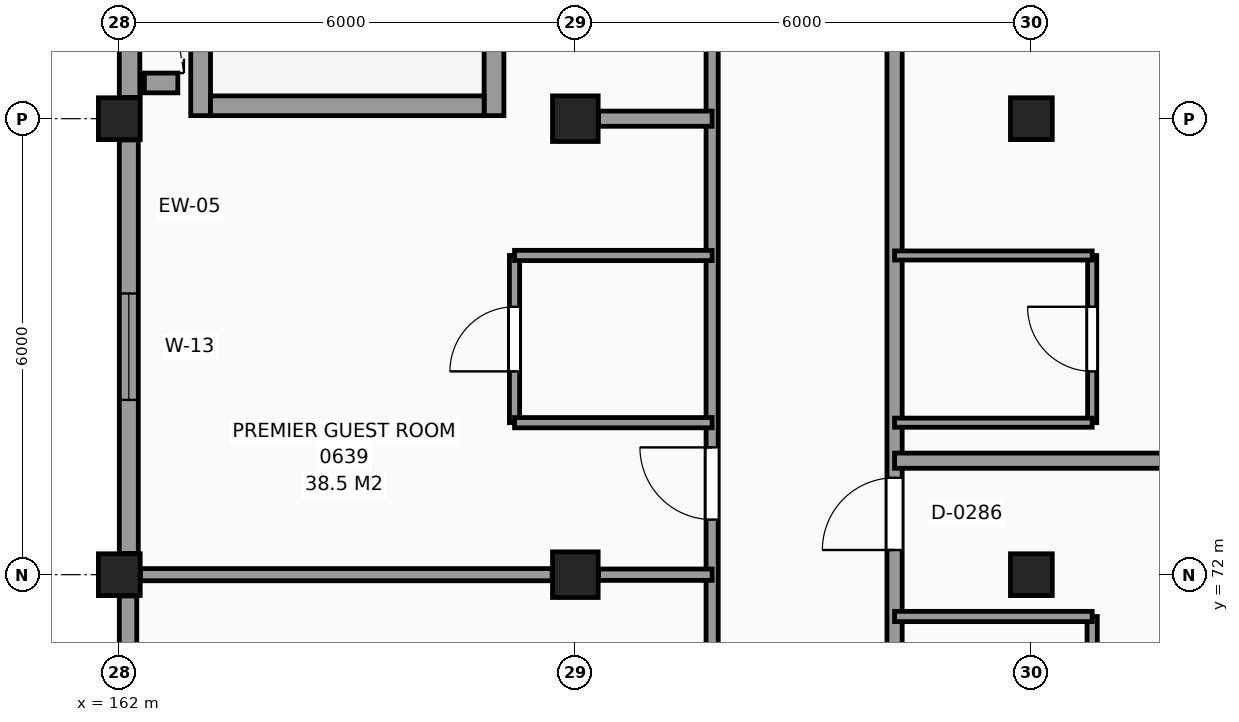
"""IFC4 building model, lengths in metres.
Left out: names, types, materials, properties, quantities, classifications, styles, units other than length and angle.
Written with IfcOpenShell. Run it as: python <this file> out.ifc"""

import sys

from ifc_helpers import new_model, si_unit, direction, frame, frame_2d, origin, origin_2d, place, context, subcontext, project, spatial, rectangle, extrude, element, fill, save


model = new_model("IFC4")
c1 = context("Model", 3, precision=1e-05, world=origin(), true_north=direction((0.0, 1.0)))
c2 = subcontext(c1, "Body", "Model", "MODEL_VIEW")
j1 = project(units=[si_unit("LENGTHUNIT", "METRE"), si_unit("PLANEANGLEUNIT", "RADIAN")], contexts=[c1])
p1 = place(None, origin())
s1 = spatial("IfcSite", under=j1, at=p1, CompositionType="ELEMENT")
p2 = place(p1, origin())
s2 = spatial("IfcBuilding", under=s1, at=p2, CompositionType="ELEMENT")
p3 = place(p2, frame((0.0, 0.0, 28.2)))
s3 = spatial("IfcBuildingStorey", under=s2, at=p3, CompositionType="ELEMENT", Elevation=28.2)
for number, where, z_axis, x_axis in (
    (1, (162.0, 72.0, 0.0), (0.0, 0.0, 1.0), (1.0, 0.0, 0.0)),
    (2, (162.0, 78.0, 0.0), (0.0, 0.0, 1.0), (1.0, 0.0, 0.0)),
):
    element("IfcColumn", number, at=place(p3, frame(where, z_axis=z_axis, x_axis=x_axis)), inside=s3, PredefinedType="COLUMN", context=c2, shape_type="SweptSolid", body=[
        extrude(rectangle(XDim=0.55, YDim=0.55, at=origin_2d()), origin(), (0.0, 0.0, 1.0), 3.3),
    ])
for number, where, z_axis, x_axis in (
    (3, (168.0, 72.0, 0.0), (0.0, 0.0, 1.0), (1.0, 0.0, 0.0)),
    (4, (168.0, 78.0, 0.0), (0.0, 0.0, 1.0), (1.0, 0.0, 0.0)),
):
    element("IfcColumn", number, at=place(p3, frame(where, z_axis=z_axis, x_axis=x_axis)), inside=s3, PredefinedType="COLUMN", context=c2, shape_type="SweptSolid", body=[
        extrude(rectangle(XDim=0.6, YDim=0.6, at=origin_2d()), origin(), (0.0, 0.0, 1.0), 3.3),
    ])
for number, where, z_axis, x_axis in (
    (5, (174.0, 72.0, 0.0), (0.0, 0.0, 1.0), (1.0, 0.0, 0.0)),
    (6, (174.0, 78.0, 0.0), (0.0, 0.0, 1.0), (1.0, 0.0, 0.0)),
):
    element("IfcColumn", number, at=place(p3, frame(where, z_axis=z_axis, x_axis=x_axis)), inside=s3, PredefinedType="COLUMN", context=c2, shape_type="SweptSolid", body=[
        extrude(rectangle(XDim=0.55, YDim=0.55, at=origin_2d()), origin(), (0.0, 0.0, 1.0), 3.3),
    ])
p4 = place(p3, frame((162.135, 83.72, 0.0), z_axis=(0.0, 0.0, 1.0), x_axis=(0.0, -1.0, 0.0)))
e7 = element("IfcWall", 7, at=p4, inside=s3, PredefinedType="SOLIDWALL", context=c2, shape_type="SweptSolid", body=[
    extrude(rectangle(XDim=5.44, YDim=0.27, at=frame_2d((2.72, 0.0))), origin(), (0.0, 0.0, 1.0), 3.08),
])
p5 = place(p3, frame((162.125, 77.72, 0.0), z_axis=(0.0, 0.0, 1.0), x_axis=(0.0, -1.0, 0.0)))
e8 = element("IfcWall", 8, at=p5, inside=s3, PredefinedType="SOLIDWALL", context=c2, shape_type="SweptSolid", body=[
    extrude(rectangle(XDim=5.44, YDim=0.25, at=frame_2d((2.72, 0.0))), origin(), (0.0, 0.0, 1.0), 2.43),
])
p6 = place(p5, frame((2.02, 0.0, 0.8)))
e9 = element("IfcOpeningElement", 9, at=p6, cuts=e8, PredefinedType="OPENING", context=c2, shape_type="SweptSolid", body=[
    extrude(rectangle(XDim=1.4, YDim=1.4, at=frame_2d((0.7, 0.7))), frame((0.0, 0.135, 0.0), z_axis=(0.0, -1.0, 0.0), x_axis=(1.0, 0.0, 0.0)), (0.0, 0.0, 1.0), 0.27),
])
p7 = place(p3, frame((162.115, 71.72, 0.0), z_axis=(0.0, 0.0, 1.0), x_axis=(0.0, -1.0, 0.0)))
e10 = element("IfcWall", 10, at=p7, inside=s3, PredefinedType="SOLIDWALL", context=c2, shape_type="SweptSolid", body=[
    extrude(rectangle(XDim=5.44, YDim=0.23, at=frame_2d((2.72, 0.0))), origin(), (0.0, 0.0, 1.0), 2.43),
])
p8 = place(p7, frame((2.02, 0.0, 0.8)))
e11 = element("IfcOpeningElement", 11, at=p8, cuts=e10, PredefinedType="OPENING", context=c2, shape_type="SweptSolid", body=[
    extrude(rectangle(XDim=1.4, YDim=1.4, at=frame_2d((0.7, 0.7))), frame((0.0, 0.125, 0.0), z_axis=(0.0, -1.0, 0.0), x_axis=(1.0, 0.0, 0.0)), (0.0, 0.0, 1.0), 0.25),
])
for number, where, z_axis, x_axis in (
    (12, (163.07, 78.04, 0.0), (0.0, 0.0, 1.0), (0.0, 1.0, 0.0)),
    (13, (166.93, 78.04, 0.0), (0.0, 0.0, 1.0), (0.0, 1.0, 0.0)),
):
    element("IfcWall", number, at=place(p3, frame(where, z_axis=z_axis, x_axis=x_axis)), inside=s3, PredefinedType="SHEAR", context=c2, shape_type="SweptSolid", body=[
        extrude(rectangle(XDim=10.72, YDim=0.26, at=frame_2d((5.36, 0.0))), origin(), (0.0, 0.0, 1.0), 3.3),
    ])
p9 = place(p3, frame((163.2, 78.17, 0.0), z_axis=(0.0, 0.0, 1.0), x_axis=(1.0, 0.0, 0.0)))
e14 = element("IfcWall", 14, at=p9, inside=s3, PredefinedType="SHEAR", context=c2, shape_type="SweptSolid", body=[
    extrude(rectangle(XDim=3.6, YDim=0.26, at=frame_2d((1.8, 0.0))), origin(), (0.0, 0.0, 1.0), 3.3),
])
p10 = place(p3, frame((162.33, 78.47, 0.0), z_axis=(0.0, 0.0, 1.0), x_axis=(1.0, 0.0, 0.0)))
e15 = element("IfcWall", 15, at=p10, inside=s3, PredefinedType="SHEAR", context=c2, shape_type="SweptSolid", body=[
    extrude(rectangle(XDim=0.44, YDim=0.26, at=frame_2d((0.22, 0.0))), origin(), (0.0, 0.0, 1.0), 3.3),
])
p11 = place(p3, frame((167.2, 74.0, 0.0), z_axis=(0.0, 0.0, 1.0), x_axis=(0.0, 1.0, 0.0)))
e16 = element("IfcWall", 16, at=p11, inside=s3, PredefinedType="PARTITIONING", context=c2, shape_type="SweptSolid", body=[
    extrude(rectangle(XDim=2.2, YDim=0.135, at=frame_2d((1.1, 0.0))), origin(), (0.0, 0.0, 1.0), 3.08),
])
p12 = place(p11, frame((0.675, 0.0, 0.0)))
e17 = element("IfcOpeningElement", 17, at=p12, cuts=e16, PredefinedType="OPENING", context=c2, shape_type="SweptSolid", body=[
    extrude(rectangle(XDim=0.85, YDim=2.1, at=frame_2d((0.425, 1.05))), frame((0.0, 0.078, 0.0), z_axis=(0.0, -1.0, 0.0), x_axis=(1.0, 0.0, 0.0)), (0.0, 0.0, 1.0), 0.155),
])
p13 = place(p3, frame((169.8, 42.275, 0.0), z_axis=(0.0, 0.0, 1.0), x_axis=(0.0, 1.0, 0.0)))
e18 = element("IfcWall", 18, at=p13, inside=s3, PredefinedType="PARTITIONING", context=c2, shape_type="SweptSolid", body=[
    extrude(rectangle(XDim=65.545, YDim=0.16, at=frame_2d((32.772, 0.0))), origin(), (0.0, 0.0, 1.0), 3.08),
])
p14 = place(p13, frame((50.125, 0.0, 0.0)))
e19 = element("IfcOpeningElement", 19, at=p14, cuts=e18, PredefinedType="OPENING", context=c2, shape_type="SweptSolid", body=[
    extrude(rectangle(XDim=1.2, YDim=2.2, at=frame_2d((0.6, 1.1))), frame((0.0, 0.09, 0.0), z_axis=(0.0, -1.0, 0.0), x_axis=(1.0, 0.0, 0.0)), (0.0, 0.0, 1.0), 0.18),
])
p15 = place(p13, frame((0.4, 0.0, 0.0)))
e20 = element("IfcOpeningElement", 20, at=p15, cuts=e18, PredefinedType="OPENING", context=c2, shape_type="SweptSolid", body=[
    extrude(rectangle(XDim=0.95, YDim=2.1, at=frame_2d((0.475, 1.05))), frame((0.0, 0.09, 0.0), z_axis=(0.0, -1.0, 0.0), x_axis=(1.0, 0.0, 0.0)), (0.0, 0.0, 1.0), 0.18),
])
p16 = place(p13, frame((6.45, 0.0, 0.0)))
e21 = element("IfcOpeningElement", 21, at=p16, cuts=e18, PredefinedType="OPENING", context=c2, shape_type="SweptSolid", body=[
    extrude(rectangle(XDim=0.95, YDim=2.1, at=frame_2d((0.475, 1.05))), frame((0.0, 0.09, 0.0), z_axis=(0.0, -1.0, 0.0), x_axis=(1.0, 0.0, 0.0)), (0.0, 0.0, 1.0), 0.18),
])
p17 = place(p13, frame((12.45, 0.0, 0.0)))
e22 = element("IfcOpeningElement", 22, at=p17, cuts=e18, PredefinedType="OPENING", context=c2, shape_type="SweptSolid", body=[
    extrude(rectangle(XDim=0.95, YDim=2.1, at=frame_2d((0.475, 1.05))), frame((0.0, 0.09, 0.0), z_axis=(0.0, -1.0, 0.0), x_axis=(1.0, 0.0, 0.0)), (0.0, 0.0, 1.0), 0.18),
])
p18 = place(p13, frame((18.45, 0.0, 0.0)))
e23 = element("IfcOpeningElement", 23, at=p18, cuts=e18, PredefinedType="OPENING", context=c2, shape_type="SweptSolid", body=[
    extrude(rectangle(XDim=0.95, YDim=2.1, at=frame_2d((0.475, 1.05))), frame((0.0, 0.09, 0.0), z_axis=(0.0, -1.0, 0.0), x_axis=(1.0, 0.0, 0.0)), (0.0, 0.0, 1.0), 0.18),
])
p19 = place(p13, frame((24.45, 0.0, 0.0)))
e24 = element("IfcOpeningElement", 24, at=p19, cuts=e18, PredefinedType="OPENING", context=c2, shape_type="SweptSolid", body=[
    extrude(rectangle(XDim=0.95, YDim=2.1, at=frame_2d((0.475, 1.05))), frame((0.0, 0.09, 0.0), z_axis=(0.0, -1.0, 0.0), x_axis=(1.0, 0.0, 0.0)), (0.0, 0.0, 1.0), 0.18),
])
p20 = place(p13, frame((30.45, 0.0, 0.0)))
e25 = element("IfcOpeningElement", 25, at=p20, cuts=e18, PredefinedType="OPENING", context=c2, shape_type="SweptSolid", body=[
    extrude(rectangle(XDim=0.95, YDim=2.1, at=frame_2d((0.475, 1.05))), frame((0.0, 0.09, 0.0), z_axis=(0.0, -1.0, 0.0), x_axis=(1.0, 0.0, 0.0)), (0.0, 0.0, 1.0), 0.18),
])
p21 = place(p13, frame((54.45, 0.0, 0.0)))
e26 = element("IfcOpeningElement", 26, at=p21, cuts=e18, PredefinedType="OPENING", context=c2, shape_type="SweptSolid", body=[
    extrude(rectangle(XDim=0.95, YDim=2.1, at=frame_2d((0.475, 1.05))), frame((0.0, 0.09, 0.0), z_axis=(0.0, -1.0, 0.0), x_axis=(1.0, 0.0, 0.0)), (0.0, 0.0, 1.0), 0.18),
])
p22 = place(p13, frame((60.45, 0.0, 0.0)))
e27 = element("IfcOpeningElement", 27, at=p22, cuts=e18, PredefinedType="OPENING", context=c2, shape_type="SweptSolid", body=[
    extrude(rectangle(XDim=0.95, YDim=2.1, at=frame_2d((0.475, 1.05))), frame((0.0, 0.09, 0.0), z_axis=(0.0, -1.0, 0.0), x_axis=(1.0, 0.0, 0.0)), (0.0, 0.0, 1.0), 0.18),
])
p23 = place(p3, frame((172.2, 42.275, 0.0), z_axis=(0.0, 0.0, 1.0), x_axis=(0.0, 1.0, 0.0)))
e28 = element("IfcWall", 28, at=p23, inside=s3, PredefinedType="PARTITIONING", context=c2, shape_type="SweptSolid", body=[
    extrude(rectangle(XDim=65.545, YDim=0.2, at=frame_2d((32.772, 0.0))), origin(), (0.0, 0.0, 1.0), 3.08),
])
p24 = place(p23, frame((0.4, 0.0, 0.0)))
e29 = element("IfcOpeningElement", 29, at=p24, cuts=e28, PredefinedType="OPENING", context=c2, shape_type="SweptSolid", body=[
    extrude(rectangle(XDim=0.95, YDim=2.1, at=frame_2d((0.475, 1.05))), frame((0.0, 0.11, 0.0), z_axis=(0.0, -1.0, 0.0), x_axis=(1.0, 0.0, 0.0)), (0.0, 0.0, 1.0), 0.22),
])
p25 = place(p23, frame((4.85, 0.0, 0.0)))
e30 = element("IfcOpeningElement", 30, at=p25, cuts=e28, PredefinedType="OPENING", context=c2, shape_type="SweptSolid", body=[
    extrude(rectangle(XDim=0.95, YDim=2.1, at=frame_2d((0.475, 1.05))), frame((0.0, 0.11, 0.0), z_axis=(0.0, -1.0, 0.0), x_axis=(1.0, 0.0, 0.0)), (0.0, 0.0, 1.0), 0.22),
])
p26 = place(p23, frame((9.35, 0.0, 0.0)))
e31 = element("IfcOpeningElement", 31, at=p26, cuts=e28, PredefinedType="OPENING", context=c2, shape_type="SweptSolid", body=[
    extrude(rectangle(XDim=0.95, YDim=2.1, at=frame_2d((0.475, 1.05))), frame((0.0, 0.11, 0.0), z_axis=(0.0, -1.0, 0.0), x_axis=(1.0, 0.0, 0.0)), (0.0, 0.0, 1.0), 0.22),
])
p27 = place(p23, frame((18.45, 0.0, 0.0)))
e32 = element("IfcOpeningElement", 32, at=p27, cuts=e28, PredefinedType="OPENING", context=c2, shape_type="SweptSolid", body=[
    extrude(rectangle(XDim=0.95, YDim=2.1, at=frame_2d((0.475, 1.05))), frame((0.0, 0.11, 0.0), z_axis=(0.0, -1.0, 0.0), x_axis=(1.0, 0.0, 0.0)), (0.0, 0.0, 1.0), 0.22),
])
p28 = place(p23, frame((22.85, 0.0, 0.0)))
e33 = element("IfcOpeningElement", 33, at=p28, cuts=e28, PredefinedType="OPENING", context=c2, shape_type="SweptSolid", body=[
    extrude(rectangle(XDim=0.95, YDim=2.1, at=frame_2d((0.475, 1.05))), frame((0.0, 0.11, 0.0), z_axis=(0.0, -1.0, 0.0), x_axis=(1.0, 0.0, 0.0)), (0.0, 0.0, 1.0), 0.22),
])
p29 = place(p23, frame((30.05, 0.0, 0.0)))
e34 = element("IfcOpeningElement", 34, at=p29, cuts=e28, PredefinedType="OPENING", context=c2, shape_type="SweptSolid", body=[
    extrude(rectangle(XDim=0.95, YDim=2.1, at=frame_2d((0.475, 1.05))), frame((0.0, 0.11, 0.0), z_axis=(0.0, -1.0, 0.0), x_axis=(1.0, 0.0, 0.0)), (0.0, 0.0, 1.0), 0.22),
])
p30 = place(p23, frame((38.3, 0.0, 0.0)))
e35 = element("IfcOpeningElement", 35, at=p30, cuts=e28, PredefinedType="OPENING", context=c2, shape_type="SweptSolid", body=[
    extrude(rectangle(XDim=0.95, YDim=2.1, at=frame_2d((0.475, 1.05))), frame((0.0, 0.11, 0.0), z_axis=(0.0, -1.0, 0.0), x_axis=(1.0, 0.0, 0.0)), (0.0, 0.0, 1.0), 0.22),
])
p31 = place(p23, frame((40.85, 0.0, 0.0)))
e36 = element("IfcOpeningElement", 36, at=p31, cuts=e28, PredefinedType="OPENING", context=c2, shape_type="SweptSolid", body=[
    extrude(rectangle(XDim=0.95, YDim=2.1, at=frame_2d((0.475, 1.05))), frame((0.0, 0.11, 0.0), z_axis=(0.0, -1.0, 0.0), x_axis=(1.0, 0.0, 0.0)), (0.0, 0.0, 1.0), 0.22),
])
p32 = place(p23, frame((48.05, 0.0, 0.0)))
e37 = element("IfcOpeningElement", 37, at=p32, cuts=e28, PredefinedType="OPENING", context=c2, shape_type="SweptSolid", body=[
    extrude(rectangle(XDim=0.95, YDim=2.1, at=frame_2d((0.475, 1.05))), frame((0.0, 0.11, 0.0), z_axis=(0.0, -1.0, 0.0), x_axis=(1.0, 0.0, 0.0)), (0.0, 0.0, 1.0), 0.22),
])
p33 = place(p23, frame((52.25, 0.0, 0.0)))
e38 = element("IfcOpeningElement", 38, at=p33, cuts=e28, PredefinedType="OPENING", context=c2, shape_type="SweptSolid", body=[
    extrude(rectangle(XDim=0.95, YDim=2.1, at=frame_2d((0.475, 1.05))), frame((0.0, 0.11, 0.0), z_axis=(0.0, -1.0, 0.0), x_axis=(1.0, 0.0, 0.0)), (0.0, 0.0, 1.0), 0.22),
])
p34 = place(p23, frame((54.45, 0.0, 0.0)))
e39 = element("IfcOpeningElement", 39, at=p34, cuts=e28, PredefinedType="OPENING", context=c2, shape_type="SweptSolid", body=[
    extrude(rectangle(XDim=0.95, YDim=2.1, at=frame_2d((0.475, 1.05))), frame((0.0, 0.11, 0.0), z_axis=(0.0, -1.0, 0.0), x_axis=(1.0, 0.0, 0.0)), (0.0, 0.0, 1.0), 0.22),
])
p35 = place(p23, frame((60.45, 0.0, 0.0)))
e40 = element("IfcOpeningElement", 40, at=p35, cuts=e28, PredefinedType="OPENING", context=c2, shape_type="SweptSolid", body=[
    extrude(rectangle(XDim=0.95, YDim=2.1, at=frame_2d((0.475, 1.05))), frame((0.0, 0.11, 0.0), z_axis=(0.0, -1.0, 0.0), x_axis=(1.0, 0.0, 0.0)), (0.0, 0.0, 1.0), 0.22),
])
p36 = place(p3, frame((174.8, 69.25, 0.0), z_axis=(0.0, 0.0, 1.0), x_axis=(0.0, 1.0, 0.0)))
e41 = element("IfcWall", 41, at=p36, inside=s3, PredefinedType="PARTITIONING", context=c2, shape_type="SweptSolid", body=[
    extrude(rectangle(XDim=2.2, YDim=0.135, at=frame_2d((1.1, 0.0))), origin(), (0.0, 0.0, 1.0), 3.08),
])
p37 = place(p36, frame((0.675, 0.0, 0.0)))
e42 = element("IfcOpeningElement", 42, at=p37, cuts=e41, PredefinedType="OPENING", context=c2, shape_type="SweptSolid", body=[
    extrude(rectangle(XDim=0.85, YDim=2.1, at=frame_2d((0.425, 1.05))), frame((0.0, 0.078, 0.0), z_axis=(0.0, -1.0, 0.0), x_axis=(1.0, 0.0, 0.0)), (0.0, 0.0, 1.0), 0.155),
])
p38 = place(p3, frame((174.8, 74.0, 0.0), z_axis=(0.0, 0.0, 1.0), x_axis=(0.0, 1.0, 0.0)))
e43 = element("IfcWall", 43, at=p38, inside=s3, PredefinedType="PARTITIONING", context=c2, shape_type="SweptSolid", body=[
    extrude(rectangle(XDim=2.2, YDim=0.12, at=frame_2d((1.1, 0.0))), origin(), (0.0, 0.0, 1.0), 3.08),
])
p39 = place(p38, frame((0.675, 0.0, 0.0)))
e44 = element("IfcOpeningElement", 44, at=p39, cuts=e43, PredefinedType="OPENING", context=c2, shape_type="SweptSolid", body=[
    extrude(rectangle(XDim=0.85, YDim=2.1, at=frame_2d((0.425, 1.05))), frame((0.0, 0.07, 0.0), z_axis=(0.0, -1.0, 0.0), x_axis=(1.0, 0.0, 0.0)), (0.0, 0.0, 1.0), 0.14),
])
p40 = place(p3, frame((172.2, 71.45, 0.0), z_axis=(0.0, 0.0, 1.0), x_axis=(1.0, 0.0, 0.0)))
e45 = element("IfcWall", 45, at=p40, inside=s3, PredefinedType="PARTITIONING", context=c2, shape_type="SweptSolid", body=[
    extrude(rectangle(XDim=2.6, YDim=0.135, at=frame_2d((1.3, 0.0))), origin(), (0.0, 0.0, 1.0), 3.08),
])
p41 = place(p3, frame((162.28, 72.0, 0.0), z_axis=(0.0, 0.0, 1.0), x_axis=(1.0, 0.0, 0.0)))
e46 = element("IfcWall", 46, at=p41, inside=s3, PredefinedType="PARTITIONING", context=c2, shape_type="SweptSolid", body=[
    extrude(rectangle(XDim=5.415, YDim=0.16, at=frame_2d((2.708, 0.0))), origin(), (0.0, 0.0, 1.0), 2.28),
])
p42 = place(p3, frame((168.305, 72.0, 0.0), z_axis=(0.0, 0.0, 1.0), x_axis=(1.0, 0.0, 0.0)))
e47 = element("IfcWall", 47, at=p42, inside=s3, PredefinedType="PARTITIONING", context=c2, shape_type="SweptSolid", body=[
    extrude(rectangle(XDim=1.495, YDim=0.15, at=frame_2d((0.748, 0.0))), origin(), (0.0, 0.0, 1.0), 2.28),
])
p43 = place(p3, frame((172.2, 73.5, 0.0), z_axis=(0.0, 0.0, 1.0), x_axis=(1.0, 0.0, 0.0)))
e48 = element("IfcWall", 48, at=p43, inside=s3, PredefinedType="PARTITIONING", context=c2, shape_type="SweptSolid", body=[
    extrude(rectangle(XDim=7.545, YDim=0.2, at=frame_2d((3.772, 0.0))), origin(), (0.0, 0.0, 1.0), 3.08),
])
p44 = place(p3, frame((167.2, 74.0, 0.0), z_axis=(0.0, 0.0, 1.0), x_axis=(1.0, 0.0, 0.0)))
e49 = element("IfcWall", 49, at=p44, inside=s3, PredefinedType="PARTITIONING", context=c2, shape_type="SweptSolid", body=[
    extrude(rectangle(XDim=2.6, YDim=0.135, at=frame_2d((1.3, 0.0))), origin(), (0.0, 0.0, 1.0), 3.08),
])
p45 = place(p3, frame((172.2, 74.0, 0.0), z_axis=(0.0, 0.0, 1.0), x_axis=(1.0, 0.0, 0.0)))
e50 = element("IfcWall", 50, at=p45, inside=s3, PredefinedType="PARTITIONING", context=c2, shape_type="SweptSolid", body=[
    extrude(rectangle(XDim=2.6, YDim=0.12, at=frame_2d((1.3, 0.0))), origin(), (0.0, 0.0, 1.0), 3.08),
])
p46 = place(p3, frame((167.2, 76.2, 0.0), z_axis=(0.0, 0.0, 1.0), x_axis=(1.0, 0.0, 0.0)))
e51 = element("IfcWall", 51, at=p46, inside=s3, PredefinedType="PARTITIONING", context=c2, shape_type="SweptSolid", body=[
    extrude(rectangle(XDim=2.6, YDim=0.135, at=frame_2d((1.3, 0.0))), origin(), (0.0, 0.0, 1.0), 3.08),
])
p47 = place(p3, frame((172.2, 76.2, 0.0), z_axis=(0.0, 0.0, 1.0), x_axis=(1.0, 0.0, 0.0)))
e52 = element("IfcWall", 52, at=p47, inside=s3, PredefinedType="PARTITIONING", context=c2, shape_type="SweptSolid", body=[
    extrude(rectangle(XDim=2.6, YDim=0.12, at=frame_2d((1.3, 0.0))), origin(), (0.0, 0.0, 1.0), 3.08),
])
p48 = place(p3, frame((168.305, 78.0, 0.0), z_axis=(0.0, 0.0, 1.0), x_axis=(1.0, 0.0, 0.0)))
e53 = element("IfcWall", 53, at=p48, inside=s3, PredefinedType="PARTITIONING", context=c2, shape_type="SweptSolid", body=[
    extrude(rectangle(XDim=1.495, YDim=0.2, at=frame_2d((0.748, 0.0))), origin(), (0.0, 0.0, 1.0), 2.28),
])
p49 = place(p6, origin())
e54 = element("IfcWindow", 54, at=p49, inside=s3, PartitioningType="SINGLE_PANEL", PredefinedType="WINDOW", context=c2, shape_type="SweptSolid", body=[
    extrude(rectangle(XDim=1.4, YDim=1.4, at=frame_2d((0.7, 0.7))), frame((0.0, 0.03, 0.0), z_axis=(0.0, -1.0, 0.0), x_axis=(1.0, 0.0, 0.0)), (0.0, 0.0, 1.0), 0.06),
])
fill(e9, e54)
p50 = place(p29, origin())
e55 = element("IfcDoor", 55, at=p50, inside=s3, OperationType="SINGLE_SWING_LEFT", PredefinedType="DOOR", context=c2, shape_type="SweptSolid", body=[
    extrude(rectangle(XDim=0.95, YDim=2.1, at=frame_2d((0.475, 1.05))), frame((0.0, 0.025, 0.0), z_axis=(0.0, -1.0, 0.0), x_axis=(1.0, 0.0, 0.0)), (0.0, 0.0, 1.0), 0.05),
])
fill(e34, e55)
p51 = place(p39, origin())
e56 = element("IfcDoor", 56, at=p51, inside=s3, OperationType="SINGLE_SWING_RIGHT", PredefinedType="DOOR", context=c2, shape_type="SweptSolid", body=[
    extrude(rectangle(XDim=0.85, YDim=2.1, at=frame_2d((0.425, 1.05))), frame((0.0, 0.025, 0.0), z_axis=(0.0, -1.0, 0.0), x_axis=(1.0, 0.0, 0.0)), (0.0, 0.0, 1.0), 0.05),
])
fill(e44, e56)
p52 = place(p12, origin())
e57 = element("IfcDoor", 57, at=p52, inside=s3, OperationType="SINGLE_SWING_LEFT", PredefinedType="DOOR", context=c2, shape_type="SweptSolid", body=[
    extrude(rectangle(XDim=0.85, YDim=2.1, at=frame_2d((0.425, 1.05))), frame((0.0, 0.025, 0.0), z_axis=(0.0, -1.0, 0.0), x_axis=(1.0, 0.0, 0.0)), (0.0, 0.0, 1.0), 0.05),
])
fill(e17, e57)
p53 = place(p20, origin())
e58 = element("IfcDoor", 58, at=p53, inside=s3, OperationType="SINGLE_SWING_RIGHT", PredefinedType="DOOR", context=c2, shape_type="SweptSolid", body=[
    extrude(rectangle(XDim=0.95, YDim=2.1, at=frame_2d((0.475, 1.05))), frame((0.0, 0.025, 0.0), z_axis=(0.0, -1.0, 0.0), x_axis=(1.0, 0.0, 0.0)), (0.0, 0.0, 1.0), 0.05),
])
fill(e25, e58)
save(model, sys.argv[1])
